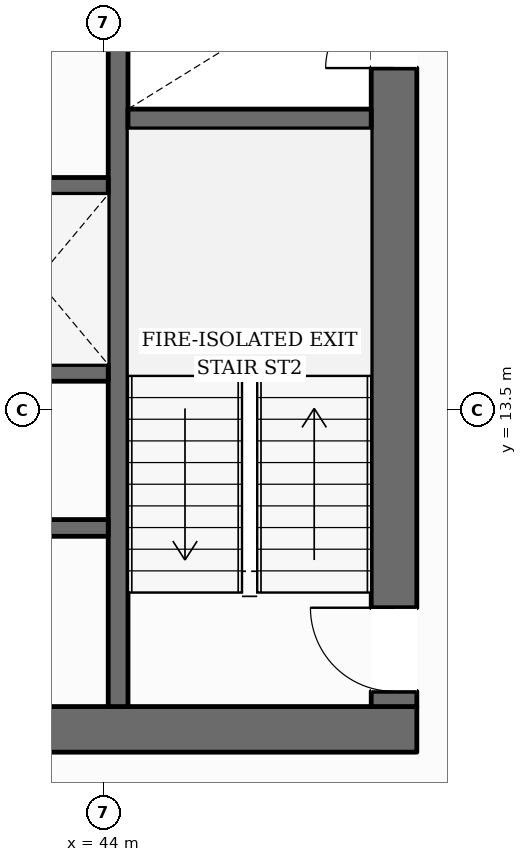
"""IFC4 building model, lengths in metres.
Left out: names, types, materials, properties, quantities, classifications, styles, units other than length and angle.
Written with IfcOpenShell. Run it as: python <this file> out.ifc"""

import sys

from ifc_helpers import new_model, si_unit, direction, frame, frame_2d, origin, place, context, subcontext, project, spatial, rectangle, extrude, element, fill, save


model = new_model("IFC4")
c1 = context("Model", 3, precision=1e-05, world=origin(), true_north=direction((0.0, 1.0)))
c2 = subcontext(c1, "Body", "Model", "MODEL_VIEW")
j1 = project(units=[si_unit("LENGTHUNIT", "METRE"), si_unit("PLANEANGLEUNIT", "RADIAN")], contexts=[c1])
p1 = place(None, origin())
s1 = spatial("IfcSite", under=j1, at=p1, CompositionType="ELEMENT")
p2 = place(p1, origin())
s2 = spatial("IfcBuilding", under=s1, at=p2, CompositionType="ELEMENT")
p3 = place(p2, frame((0.0, 0.0, 9.85)))
s3 = spatial("IfcBuildingStorey", under=s2, at=p3, CompositionType="ELEMENT", Elevation=9.85)
p4 = place(p3, frame((27.88, 9.3, 0.0), z_axis=(0.0, 0.0, 1.0), x_axis=(1.0, 0.0, 0.0)))
e1 = element("IfcWall", 1, at=p4, inside=s3, PredefinedType="SOLIDWALL", context=c2, shape_type="SweptSolid", body=[
    extrude(rectangle(XDim=20.24, YDim=0.6, at=frame_2d((10.12, 0.0))), origin(), (0.0, 0.0, 1.0), 3.59),
])
p5 = place(p4, frame((10.62, 0.0, 0.0)))
e2 = element("IfcOpeningElement", 2, at=p5, cuts=e1, PredefinedType="OPENING", context=c2, shape_type="SweptSolid", body=[
    extrude(rectangle(XDim=1.4, YDim=2.2, at=frame_2d((0.7, 1.1))), frame((0.0, 0.31, 0.0), z_axis=(0.0, -1.0, 0.0), x_axis=(1.0, 0.0, 0.0)), (0.0, 0.0, 1.0), 0.62),
])
p6 = place(p3, frame((47.82, 9.6, 0.0), z_axis=(0.0, 0.0, 1.0), x_axis=(0.0, 1.0, 0.0)))
e3 = element("IfcWall", 3, at=p6, inside=s3, PredefinedType="SOLIDWALL", context=c2, shape_type="SweptSolid", body=[
    extrude(rectangle(XDim=13.0, YDim=0.6, at=frame_2d((6.5, 0.0))), origin(), (0.0, 0.0, 1.0), 3.59),
])
p7 = place(p6, frame((0.2, 0.0, 0.0)))
e4 = element("IfcOpeningElement", 4, at=p7, cuts=e3, PredefinedType="OPENING", context=c2, shape_type="SweptSolid", body=[
    extrude(rectangle(XDim=1.1, YDim=2.15, at=frame_2d((0.55, 1.075))), frame((0.0, 0.31, 0.0), z_axis=(0.0, -1.0, 0.0), x_axis=(1.0, 0.0, 0.0)), (0.0, 0.0, 1.0), 0.62),
])
p8 = place(p6, frame((8.4, 0.0, 0.0)))
e5 = element("IfcOpeningElement", 5, at=p8, cuts=e3, PredefinedType="OPENING", context=c2, shape_type="SweptSolid", body=[
    extrude(rectangle(XDim=0.9, YDim=2.1, at=frame_2d((0.45, 1.05))), frame((0.0, 0.31, 0.0), z_axis=(0.0, -1.0, 0.0), x_axis=(1.0, 0.0, 0.0)), (0.0, 0.0, 1.0), 0.62),
])
p9 = place(p3, frame((44.19, 9.6, 0.0), z_axis=(0.0, 0.0, 1.0), x_axis=(0.0, 1.0, 0.0)))
e6 = element("IfcWall", 6, at=p9, inside=s3, PredefinedType="SHEAR", context=c2, shape_type="SweptSolid", body=[
    extrude(rectangle(XDim=13.0, YDim=0.26, at=frame_2d((6.5, 0.0))), origin(), (0.0, 0.0, 1.0), 3.59),
])
p10 = place(p9, frame((10.925, 0.0, 0.0)))
e7 = element("IfcOpeningElement", 7, at=p10, cuts=e6, PredefinedType="OPENING", context=c2, shape_type="SweptSolid", body=[
    extrude(rectangle(XDim=1.25, YDim=2.25, at=frame_2d((0.625, 1.125))), frame((0.0, 0.14, 0.0), z_axis=(0.0, -1.0, 0.0), x_axis=(1.0, 0.0, 0.0)), (0.0, 0.0, 1.0), 0.28),
])
p11 = place(p3, frame((44.32, 17.33, 0.0), z_axis=(0.0, 0.0, 1.0), x_axis=(1.0, 0.0, 0.0)))
e8 = element("IfcWall", 8, at=p11, inside=s3, PredefinedType="SHEAR", context=c2, shape_type="SweptSolid", body=[
    extrude(rectangle(XDim=3.2, YDim=0.26, at=frame_2d((1.6, 0.0))), origin(), (0.0, 0.0, 1.0), 3.59),
])
p12 = place(p3, frame((31.94, 16.45, 0.0), z_axis=(0.0, 0.0, 1.0), x_axis=(1.0, 0.0, 0.0)))
e9 = element("IfcWall", 9, at=p12, inside=s3, PredefinedType="SOLIDWALL", context=c2, shape_type="SweptSolid", body=[
    extrude(rectangle(XDim=12.12, YDim=0.22, at=frame_2d((6.06, 0.0))), origin(), (0.0, 0.0, 1.0), 3.59),
])
p13 = place(p3, frame((31.94, 13.99, 0.0), z_axis=(0.0, 0.0, 1.0), x_axis=(1.0, 0.0, 0.0)))
e10 = element("IfcWall", 10, at=p13, inside=s3, PredefinedType="SOLIDWALL", context=c2, shape_type="SweptSolid", body=[
    extrude(rectangle(XDim=12.12, YDim=0.22, at=frame_2d((6.06, 0.0))), origin(), (0.0, 0.0, 1.0), 3.59),
])
p14 = place(p13, frame((0.385, 0.0, 0.0)))
e11 = element("IfcOpeningElement", 11, at=p14, cuts=e10, PredefinedType="OPENING", context=c2, shape_type="SweptSolid", body=[
    extrude(rectangle(XDim=1.1, YDim=2.2, at=frame_2d((0.55, 1.1))), frame((0.0, 0.12, 0.0), z_axis=(0.0, -1.0, 0.0), x_axis=(1.0, 0.0, 0.0)), (0.0, 0.0, 1.0), 0.24),
])
p15 = place(p13, frame((2.435, 0.0, 0.0)))
e12 = element("IfcOpeningElement", 12, at=p15, cuts=e10, PredefinedType="OPENING", context=c2, shape_type="SweptSolid", body=[
    extrude(rectangle(XDim=1.1, YDim=2.2, at=frame_2d((0.55, 1.1))), frame((0.0, 0.12, 0.0), z_axis=(0.0, -1.0, 0.0), x_axis=(1.0, 0.0, 0.0)), (0.0, 0.0, 1.0), 0.24),
])
p16 = place(p13, frame((4.485, 0.0, 0.0)))
e13 = element("IfcOpeningElement", 13, at=p16, cuts=e10, PredefinedType="OPENING", context=c2, shape_type="SweptSolid", body=[
    extrude(rectangle(XDim=1.1, YDim=2.2, at=frame_2d((0.55, 1.1))), frame((0.0, 0.12, 0.0), z_axis=(0.0, -1.0, 0.0), x_axis=(1.0, 0.0, 0.0)), (0.0, 0.0, 1.0), 0.24),
])
p17 = place(p3, frame((40.28, 11.95, 0.0), z_axis=(0.0, 0.0, 1.0), x_axis=(1.0, 0.0, 0.0)))
e14 = element("IfcWall", 14, at=p17, inside=s3, PredefinedType="SOLIDWALL", context=c2, shape_type="SweptSolid", body=[
    extrude(rectangle(XDim=3.78, YDim=0.22, at=frame_2d((1.89, 0.0))), origin(), (0.0, 0.0, 1.0), 3.59),
])
p18 = place(p17, frame((1.55, 0.0, 0.0)))
e15 = element("IfcOpeningElement", 15, at=p18, cuts=e14, PredefinedType="OPENING", context=c2, shape_type="SweptSolid", body=[
    extrude(rectangle(XDim=0.9, YDim=2.1, at=frame_2d((0.45, 1.05))), frame((0.0, 0.12, 0.0), z_axis=(0.0, -1.0, 0.0), x_axis=(1.0, 0.0, 0.0)), (0.0, 0.0, 1.0), 0.24),
])
p19 = place(p3, frame((46.044, 44.103, 0.0), z_axis=(0.0, 0.0, 1.0), x_axis=(0.496189626602, -0.86821417545, 0.0)))
e16 = element("IfcWall", 16, at=p19, inside=s3, PredefinedType="STANDARD", context=c2, shape_type="SweptSolid", body=[
    extrude(rectangle(XDim=33.196, YDim=0.38, at=frame_2d((16.598, 0.0))), origin(), (0.0, 0.0, 1.0), 2.97),
])
p20 = place(p19, frame((7.899, 0.0, 0.0)))
e17 = element("IfcOpeningElement", 17, at=p20, cuts=e16, PredefinedType="OPENING", context=c2, shape_type="SweptSolid", body=[
    extrude(rectangle(XDim=1.0, YDim=2.2, at=frame_2d((0.5, 1.1))), frame((0.0, 0.2, 0.0), z_axis=(0.0, -1.0, 0.0), x_axis=(1.0, 0.0, 0.0)), (0.0, 0.0, 1.0), 0.4),
])
p21 = place(p19, frame((29.209, 0.0, 0.65)))
e18 = element("IfcOpeningElement", 18, at=p21, cuts=e16, PredefinedType="OPENING", context=c2, shape_type="SweptSolid", body=[
    extrude(rectangle(XDim=1.65, YDim=1.75, at=frame_2d((0.825, 0.875))), frame((0.0, 0.2, 0.0), z_axis=(0.0, -1.0, 0.0), x_axis=(1.0, 0.0, 0.0)), (0.0, 0.0, 1.0), 0.4),
])
p22 = place(p19, frame((23.835, 0.0, 0.65)))
e19 = element("IfcOpeningElement", 19, at=p22, cuts=e16, PredefinedType="OPENING", context=c2, shape_type="SweptSolid", body=[
    extrude(rectangle(XDim=1.65, YDim=1.75, at=frame_2d((0.825, 0.875))), frame((0.0, 0.2, 0.0), z_axis=(0.0, -1.0, 0.0), x_axis=(1.0, 0.0, 0.0)), (0.0, 0.0, 1.0), 0.4),
])
p23 = place(p19, frame((18.462, 0.0, 0.65)))
e20 = element("IfcOpeningElement", 20, at=p23, cuts=e16, PredefinedType="OPENING", context=c2, shape_type="SweptSolid", body=[
    extrude(rectangle(XDim=1.65, YDim=1.75, at=frame_2d((0.825, 0.875))), frame((0.0, 0.2, 0.0), z_axis=(0.0, -1.0, 0.0), x_axis=(1.0, 0.0, 0.0)), (0.0, 0.0, 1.0), 0.4),
])
p24 = place(p19, frame((2.342, 0.0, 0.65)))
e21 = element("IfcOpeningElement", 21, at=p24, cuts=e16, PredefinedType="OPENING", context=c2, shape_type="SweptSolid", body=[
    extrude(rectangle(XDim=1.65, YDim=1.75, at=frame_2d((0.825, 0.875))), frame((0.0, 0.2, 0.0), z_axis=(0.0, -1.0, 0.0), x_axis=(1.0, 0.0, 0.0)), (0.0, 0.0, 1.0), 0.4),
])
p25 = place(p7, origin())
e22 = element("IfcDoor", 22, at=p25, inside=s3, OperationType="SINGLE_SWING_RIGHT", PredefinedType="DOOR", context=c2, shape_type="SweptSolid", body=[
    extrude(rectangle(XDim=1.1, YDim=2.15, at=frame_2d((0.55, 1.075))), frame((0.0, 0.025, 0.0), z_axis=(0.0, -1.0, 0.0), x_axis=(1.0, 0.0, 0.0)), (0.0, 0.0, 1.0), 0.05),
])
fill(e4, e22)
p26 = place(p8, origin())
e23 = element("IfcDoor", 23, at=p26, inside=s3, OperationType="SINGLE_SWING_LEFT", PredefinedType="DOOR", context=c2, shape_type="SweptSolid", body=[
    extrude(rectangle(XDim=0.9, YDim=2.1, at=frame_2d((0.45, 1.05))), frame((0.0, 0.025, 0.0), z_axis=(0.0, -1.0, 0.0), x_axis=(1.0, 0.0, 0.0)), (0.0, 0.0, 1.0), 0.05),
])
fill(e5, e23)
save(model, sys.argv[1])
